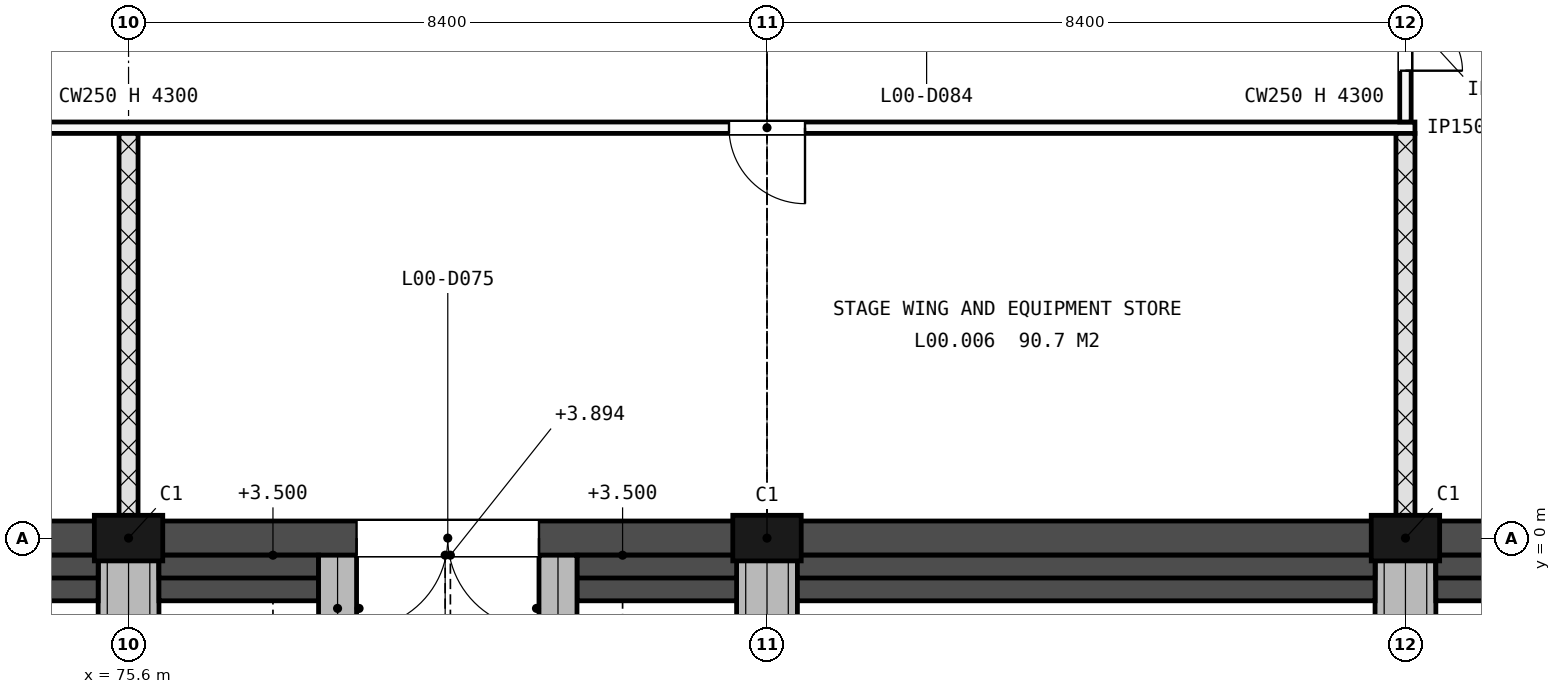
"""IFC4 building model, lengths in metres.
Left out: names, types, materials, properties, quantities, classifications, styles, units other than length and angle.
Written with IfcOpenShell. Run it as: python <this file> out.ifc"""

import sys

from ifc_helpers import new_model, si_unit, direction, frame, frame_2d, origin, origin_2d, place, context, subcontext, project, spatial, rectangle, extrude, element, fill, save


model = new_model("IFC4")
c1 = context("Model", 3, precision=1e-05, world=origin(), true_north=direction((0.0, 1.0)))
c2 = subcontext(c1, "Body", "Model", "MODEL_VIEW")
j1 = project(units=[si_unit("LENGTHUNIT", "METRE"), si_unit("PLANEANGLEUNIT", "RADIAN")], contexts=[c1])
p1 = place(None, origin())
s1 = spatial("IfcSite", under=j1, at=p1, CompositionType="ELEMENT")
p2 = place(p1, origin())
s2 = spatial("IfcBuilding", under=s1, at=p2, CompositionType="ELEMENT")
p3 = place(p2, origin())
s3 = spatial("IfcBuildingStorey", under=s2, at=p3, CompositionType="ELEMENT", Elevation=0.0)
for number, where, z_axis, x_axis in (
    (1, (75.6, 0.0, -0.3), (0.0, 0.0, 1.0), (1.0, 0.0, 0.0)),
    (2, (84.0, 0.0, -0.3), (0.0, 0.0, 1.0), (1.0, 0.0, 0.0)),
    (3, (92.4, 0.0, -0.3), (0.0, 0.0, 1.0), (1.0, 0.0, 0.0)),
):
    element("IfcColumn", number, at=place(p3, frame(where, z_axis=z_axis, x_axis=x_axis)), inside=s3, PredefinedType="PILASTER", context=c2, shape_type="SweptSolid", body=[
        extrude(rectangle(XDim=0.9, YDim=0.6, at=origin_2d()), origin(), (0.0, 0.0, 1.0), 5.4),
    ])
p4 = place(p3, frame((0.0, 0.0, -0.3), z_axis=(0.0, 0.0, 1.0), x_axis=(1.0, 0.0, 0.0)))
e4 = element("IfcWall", 4, at=p4, inside=s3, PredefinedType="SOLIDWALL", context=c2, shape_type="SweptSolid", body=[
    extrude(rectangle(XDim=168.0, YDim=0.45, at=frame_2d((84.0, 0.0))), origin(), (0.0, 0.0, 1.0), 5.4),
])
p5 = place(p4, frame((34.8, 0.0, 2.7)))
e5 = element("IfcOpeningElement", 5, at=p5, cuts=e4, PredefinedType="OPENING", context=c2, shape_type="SweptSolid", body=[
    extrude(rectangle(XDim=1.8, YDim=1.2, at=frame_2d((0.9, 0.6))), frame((0.0, 0.235, 0.0), z_axis=(0.0, -1.0, 0.0), x_axis=(1.0, 0.0, 0.0)), (0.0, 0.0, 1.0), 0.47),
])
p6 = place(p4, frame((69.075, 0.0, 1.5)))
e6 = element("IfcOpeningElement", 6, at=p6, cuts=e4, PredefinedType="OPENING", context=c2, shape_type="SweptSolid", body=[
    extrude(rectangle(XDim=0.45, YDim=2.4, at=frame_2d((0.225, 1.2))), frame((0.0, 0.235, 0.0), z_axis=(0.0, -1.0, 0.0), x_axis=(1.0, 0.0, 0.0)), (0.0, 0.0, 1.0), 0.47),
])
p7 = place(p4, frame((73.275, 0.0, 1.5)))
e7 = element("IfcOpeningElement", 7, at=p7, cuts=e4, PredefinedType="OPENING", context=c2, shape_type="SweptSolid", body=[
    extrude(rectangle(XDim=0.45, YDim=2.4, at=frame_2d((0.225, 1.2))), frame((0.0, 0.235, 0.0), z_axis=(0.0, -1.0, 0.0), x_axis=(1.0, 0.0, 0.0)), (0.0, 0.0, 1.0), 0.47),
])
p8 = place(p4, frame((135.0, 0.0, 2.7)))
e8 = element("IfcOpeningElement", 8, at=p8, cuts=e4, PredefinedType="OPENING", context=c2, shape_type="SweptSolid", body=[
    extrude(rectangle(XDim=1.8, YDim=1.2, at=frame_2d((0.9, 0.6))), frame((0.0, 0.235, 0.0), z_axis=(0.0, -1.0, 0.0), x_axis=(1.0, 0.0, 0.0)), (0.0, 0.0, 1.0), 0.47),
])
p9 = place(p4, frame((144.0, 0.0, 2.7)))
e9 = element("IfcOpeningElement", 9, at=p9, cuts=e4, PredefinedType="OPENING", context=c2, shape_type="SweptSolid", body=[
    extrude(rectangle(XDim=1.8, YDim=1.2, at=frame_2d((0.9, 0.6))), frame((0.0, 0.235, 0.0), z_axis=(0.0, -1.0, 0.0), x_axis=(1.0, 0.0, 0.0)), (0.0, 0.0, 1.0), 0.47),
])
p10 = place(p4, frame((114.6, 0.0, 0.3), z_axis=(0.0, 0.0, 1.0), x_axis=(-1.0, 0.0, 0.0)))
e10 = element("IfcOpeningElement", 10, at=p10, cuts=e4, PredefinedType="OPENING", context=c2, shape_type="SweptSolid", body=[
    extrude(rectangle(XDim=2.1, YDim=2.2, at=frame_2d((1.05, 1.1))), frame((0.0, 0.235, 0.0), z_axis=(0.0, -1.0, 0.0), x_axis=(1.0, 0.0, 0.0)), (0.0, 0.0, 1.0), 0.47),
])
p11 = place(p4, frame((117.3, 0.0, 0.3), z_axis=(0.0, 0.0, 1.0), x_axis=(-1.0, 0.0, 0.0)))
e11 = element("IfcOpeningElement", 11, at=p11, cuts=e4, PredefinedType="OPENING", context=c2, shape_type="SweptSolid", body=[
    extrude(rectangle(XDim=2.1, YDim=2.2, at=frame_2d((1.05, 1.1))), frame((0.0, 0.235, 0.0), z_axis=(0.0, -1.0, 0.0), x_axis=(1.0, 0.0, 0.0)), (0.0, 0.0, 1.0), 0.47),
])
p12 = place(p4, frame((106.05, 0.0, 0.3), z_axis=(0.0, 0.0, 1.0), x_axis=(-1.0, 0.0, 0.0)))
e12 = element("IfcOpeningElement", 12, at=p12, cuts=e4, PredefinedType="OPENING", context=c2, shape_type="SweptSolid", body=[
    extrude(rectangle(XDim=2.1, YDim=2.2, at=frame_2d((1.05, 1.1))), frame((0.0, 0.235, 0.0), z_axis=(0.0, -1.0, 0.0), x_axis=(1.0, 0.0, 0.0)), (0.0, 0.0, 1.0), 0.47),
])
p13 = place(p4, frame((57.25, 0.0, 0.3), z_axis=(0.0, 0.0, 1.0), x_axis=(-1.0, 0.0, 0.0)))
e13 = element("IfcOpeningElement", 13, at=p13, cuts=e4, PredefinedType="OPENING", context=c2, shape_type="SweptSolid", body=[
    extrude(rectangle(XDim=2.1, YDim=2.2, at=frame_2d((1.05, 1.1))), frame((0.0, 0.235, 0.0), z_axis=(0.0, -1.0, 0.0), x_axis=(1.0, 0.0, 0.0)), (0.0, 0.0, 1.0), 0.47),
])
p14 = place(p4, frame((120.75, 0.0, 0.3), z_axis=(0.0, 0.0, 1.0), x_axis=(-1.0, 0.0, 0.0)))
e14 = element("IfcOpeningElement", 14, at=p14, cuts=e4, PredefinedType="OPENING", context=c2, shape_type="SweptSolid", body=[
    extrude(rectangle(XDim=2.1, YDim=2.2, at=frame_2d((1.05, 1.1))), frame((0.0, 0.235, 0.0), z_axis=(0.0, -1.0, 0.0), x_axis=(1.0, 0.0, 0.0)), (0.0, 0.0, 1.0), 0.47),
])
p15 = place(p4, frame((124.95, 0.0, 0.3), z_axis=(0.0, 0.0, 1.0), x_axis=(-1.0, 0.0, 0.0)))
e15 = element("IfcOpeningElement", 15, at=p15, cuts=e4, PredefinedType="OPENING", context=c2, shape_type="SweptSolid", body=[
    extrude(rectangle(XDim=2.1, YDim=2.2, at=frame_2d((1.05, 1.1))), frame((0.0, 0.235, 0.0), z_axis=(0.0, -1.0, 0.0), x_axis=(1.0, 0.0, 0.0)), (0.0, 0.0, 1.0), 0.47),
])
p16 = place(p4, frame((19.45, 0.0, 0.3), z_axis=(0.0, 0.0, 1.0), x_axis=(-1.0, 0.0, 0.0)))
e16 = element("IfcOpeningElement", 16, at=p16, cuts=e4, PredefinedType="OPENING", context=c2, shape_type="SweptSolid", body=[
    extrude(rectangle(XDim=2.1, YDim=2.2, at=frame_2d((1.05, 1.1))), frame((0.0, 0.235, 0.0), z_axis=(0.0, -1.0, 0.0), x_axis=(1.0, 0.0, 0.0)), (0.0, 0.0, 1.0), 0.47),
])
p17 = place(p4, frame((162.25, 0.0, 0.3), z_axis=(0.0, 0.0, 1.0), x_axis=(-1.0, 0.0, 0.0)))
e17 = element("IfcOpeningElement", 17, at=p17, cuts=e4, PredefinedType="OPENING", context=c2, shape_type="SweptSolid", body=[
    extrude(rectangle(XDim=2.1, YDim=2.2, at=frame_2d((1.05, 1.1))), frame((0.0, 0.235, 0.0), z_axis=(0.0, -1.0, 0.0), x_axis=(1.0, 0.0, 0.0)), (0.0, 0.0, 1.0), 0.47),
])
p18 = place(p4, frame((4.8, 0.0, 0.3), z_axis=(0.0, 0.0, 1.0), x_axis=(-1.0, 0.0, 0.0)))
e18 = element("IfcOpeningElement", 18, at=p18, cuts=e4, PredefinedType="OPENING", context=c2, shape_type="SweptSolid", body=[
    extrude(rectangle(XDim=1.2, YDim=2.2, at=frame_2d((0.6, 1.1))), frame((0.0, 0.235, 0.0), z_axis=(0.0, -1.0, 0.0), x_axis=(1.0, 0.0, 0.0)), (0.0, 0.0, 1.0), 0.47),
])
p19 = place(p4, frame((64.8, 0.0, 0.3), z_axis=(0.0, 0.0, 1.0), x_axis=(-1.0, 0.0, 0.0)))
e19 = element("IfcOpeningElement", 19, at=p19, cuts=e4, PredefinedType="OPENING", context=c2, shape_type="SweptSolid", body=[
    extrude(rectangle(XDim=1.2, YDim=2.2, at=frame_2d((0.6, 1.1))), frame((0.0, 0.235, 0.0), z_axis=(0.0, -1.0, 0.0), x_axis=(1.0, 0.0, 0.0)), (0.0, 0.0, 1.0), 0.47),
])
p20 = place(p4, frame((81.0, 0.0, 0.3), z_axis=(0.0, 0.0, 1.0), x_axis=(-1.0, 0.0, 0.0)))
e20 = element("IfcOpeningElement", 20, at=p20, cuts=e4, PredefinedType="OPENING", context=c2, shape_type="SweptSolid", body=[
    extrude(rectangle(XDim=2.4, YDim=2.4, at=frame_2d((1.2, 1.2))), frame((0.0, 0.235, 0.0), z_axis=(0.0, -1.0, 0.0), x_axis=(1.0, 0.0, 0.0)), (0.0, 0.0, 1.0), 0.47),
])
p21 = place(p4, frame((97.8, 0.0, 0.3), z_axis=(0.0, 0.0, 1.0), x_axis=(-1.0, 0.0, 0.0)))
e21 = element("IfcOpeningElement", 21, at=p21, cuts=e4, PredefinedType="OPENING", context=c2, shape_type="SweptSolid", body=[
    extrude(rectangle(XDim=2.4, YDim=2.4, at=frame_2d((1.2, 1.2))), frame((0.0, 0.235, 0.0), z_axis=(0.0, -1.0, 0.0), x_axis=(1.0, 0.0, 0.0)), (0.0, 0.0, 1.0), 0.47),
])
p22 = place(p4, frame((139.8, 0.0, 0.3), z_axis=(0.0, 0.0, 1.0), x_axis=(-1.0, 0.0, 0.0)))
e22 = element("IfcOpeningElement", 22, at=p22, cuts=e4, PredefinedType="OPENING", context=c2, shape_type="SweptSolid", body=[
    extrude(rectangle(XDim=2.4, YDim=2.1, at=frame_2d((1.2, 1.05))), frame((0.0, 0.235, 0.0), z_axis=(0.0, -1.0, 0.0), x_axis=(1.0, 0.0, 0.0)), (0.0, 0.0, 1.0), 0.47),
])
p23 = place(p4, frame((156.3, 0.0, 0.3), z_axis=(0.0, 0.0, 1.0), x_axis=(-1.0, 0.0, 0.0)))
e23 = element("IfcOpeningElement", 23, at=p23, cuts=e4, PredefinedType="OPENING", context=c2, shape_type="SweptSolid", body=[
    extrude(rectangle(XDim=1.8, YDim=2.2, at=frame_2d((0.9, 1.1))), frame((0.0, 0.235, 0.0), z_axis=(0.0, -1.0, 0.0), x_axis=(1.0, 0.0, 0.0)), (0.0, 0.0, 1.0), 0.47),
])
for number, where, z_axis, x_axis in (
    (24, (75.6, -0.225, 0.0), (0.0, 0.0, 1.0), (0.0, -1.0, 0.0)),
    (25, (84.0, -0.225, 0.0), (0.0, 0.0, 1.0), (0.0, -1.0, 0.0)),
    (26, (92.4, -0.225, 0.0), (0.0, 0.0, 1.0), (0.0, -1.0, 0.0)),
):
    element("IfcWall", number, at=place(p3, frame(where, z_axis=z_axis, x_axis=x_axis)), inside=s3, PredefinedType="SOLIDWALL", context=c2, shape_type="SweptSolid", body=[
        extrude(rectangle(XDim=0.9, YDim=0.8, at=frame_2d((0.45, 0.0))), origin(), (0.0, 0.0, 1.0), 5.1),
    ])
p24 = place(p3, frame((67.6, -0.525, 0.0), z_axis=(0.0, 0.0, 1.0), x_axis=(1.0, 0.0, 0.0)))
e27 = element("IfcWall", 27, at=p24, inside=s3, PredefinedType="SOLIDWALL", context=c2, shape_type="SweptSolid", body=[
    extrude(rectangle(XDim=7.6, YDim=0.6, at=frame_2d((3.8, 0.0))), origin(), (0.0, 0.0, 1.0), 0.45),
])
p25 = place(p3, frame((67.6, -0.375, 0.45), z_axis=(0.0, 0.0, 1.0), x_axis=(1.0, 0.0, 0.0)))
e28 = element("IfcWall", 28, at=p25, inside=s3, PredefinedType="SOLIDWALL", context=c2, shape_type="SweptSolid", body=[
    extrude(rectangle(XDim=7.6, YDim=0.3, at=frame_2d((3.8, 0.0))), origin(), (0.0, 0.0, 1.0), 0.45),
])
p26 = place(p3, frame((76.0, -0.525, 0.0), z_axis=(0.0, 0.0, 1.0), x_axis=(1.0, 0.0, 0.0)))
e29 = element("IfcWall", 29, at=p26, inside=s3, PredefinedType="SOLIDWALL", context=c2, shape_type="SweptSolid", body=[
    extrude(rectangle(XDim=2.1, YDim=0.6, at=frame_2d((1.05, 0.0))), origin(), (0.0, 0.0, 1.0), 0.45),
])
p27 = place(p3, frame((76.0, -0.375, 0.45), z_axis=(0.0, 0.0, 1.0), x_axis=(1.0, 0.0, 0.0)))
e30 = element("IfcWall", 30, at=p27, inside=s3, PredefinedType="SOLIDWALL", context=c2, shape_type="SweptSolid", body=[
    extrude(rectangle(XDim=2.1, YDim=0.3, at=frame_2d((1.05, 0.0))), origin(), (0.0, 0.0, 1.0), 0.45),
])
p28 = place(p3, frame((81.5, -0.525, 0.0), z_axis=(0.0, 0.0, 1.0), x_axis=(1.0, 0.0, 0.0)))
e31 = element("IfcWall", 31, at=p28, inside=s3, PredefinedType="SOLIDWALL", context=c2, shape_type="SweptSolid", body=[
    extrude(rectangle(XDim=2.1, YDim=0.6, at=frame_2d((1.05, 0.0))), origin(), (0.0, 0.0, 1.0), 0.45),
])
p29 = place(p3, frame((81.5, -0.375, 0.45), z_axis=(0.0, 0.0, 1.0), x_axis=(1.0, 0.0, 0.0)))
e32 = element("IfcWall", 32, at=p29, inside=s3, PredefinedType="SOLIDWALL", context=c2, shape_type="SweptSolid", body=[
    extrude(rectangle(XDim=2.1, YDim=0.3, at=frame_2d((1.05, 0.0))), origin(), (0.0, 0.0, 1.0), 0.45),
])
p30 = place(p3, frame((84.4, -0.525, 0.0), z_axis=(0.0, 0.0, 1.0), x_axis=(1.0, 0.0, 0.0)))
e33 = element("IfcWall", 33, at=p30, inside=s3, PredefinedType="SOLIDWALL", context=c2, shape_type="SweptSolid", body=[
    extrude(rectangle(XDim=7.6, YDim=0.6, at=frame_2d((3.8, 0.0))), origin(), (0.0, 0.0, 1.0), 0.45),
])
p31 = place(p3, frame((84.4, -0.375, 0.45), z_axis=(0.0, 0.0, 1.0), x_axis=(1.0, 0.0, 0.0)))
e34 = element("IfcWall", 34, at=p31, inside=s3, PredefinedType="SOLIDWALL", context=c2, shape_type="SweptSolid", body=[
    extrude(rectangle(XDim=7.6, YDim=0.3, at=frame_2d((3.8, 0.0))), origin(), (0.0, 0.0, 1.0), 0.45),
])
p32 = place(p3, frame((92.8, -0.525, 0.0), z_axis=(0.0, 0.0, 1.0), x_axis=(1.0, 0.0, 0.0)))
e35 = element("IfcWall", 35, at=p32, inside=s3, PredefinedType="SOLIDWALL", context=c2, shape_type="SweptSolid", body=[
    extrude(rectangle(XDim=2.1, YDim=0.6, at=frame_2d((1.05, 0.0))), origin(), (0.0, 0.0, 1.0), 0.45),
])
p33 = place(p3, frame((92.8, -0.375, 0.45), z_axis=(0.0, 0.0, 1.0), x_axis=(1.0, 0.0, 0.0)))
e36 = element("IfcWall", 36, at=p33, inside=s3, PredefinedType="SOLIDWALL", context=c2, shape_type="SweptSolid", body=[
    extrude(rectangle(XDim=2.1, YDim=0.3, at=frame_2d((1.05, 0.0))), origin(), (0.0, 0.0, 1.0), 0.45),
])
for number, where, z_axis, x_axis in (
    (37, (78.35, -0.225, 0.0), (0.0, 0.0, 1.0), (0.0, -1.0, 0.0)),
    (38, (81.25, -0.225, 0.0), (0.0, 0.0, 1.0), (0.0, -1.0, 0.0)),
):
    element("IfcWall", number, at=place(p3, frame(where, z_axis=z_axis, x_axis=x_axis)), inside=s3, PredefinedType="SOLIDWALL", context=c2, shape_type="SweptSolid", body=[
        extrude(rectangle(XDim=1.4, YDim=0.5, at=frame_2d((0.7, 0.0))), origin(), (0.0, 0.0, 1.0), 3.28),
    ])
p34 = place(p3, frame((63.1, 5.4, 0.0), z_axis=(0.0, 0.0, 1.0), x_axis=(1.0, 0.0, 0.0)))
e39 = element("IfcWall", 39, at=p34, inside=s3, PredefinedType="PARTITIONING", context=c2, shape_type="SweptSolid", body=[
    extrude(rectangle(XDim=29.425, YDim=0.15, at=frame_2d((14.712, 0.0))), origin(), (0.0, 0.0, 1.0), 5.1),
])
p35 = place(p34, frame((5.7, 0.0, 0.0)))
e40 = element("IfcOpeningElement", 40, at=p35, cuts=e39, PredefinedType="OPENING", context=c2, shape_type="SweptSolid", body=[
    extrude(rectangle(XDim=1.0, YDim=2.1, at=frame_2d((0.5, 1.05))), frame((0.0, 0.085, 0.0), z_axis=(0.0, -1.0, 0.0), x_axis=(1.0, 0.0, 0.0)), (0.0, 0.0, 1.0), 0.17),
])
p36 = place(p34, frame((20.4, 0.0, 0.0)))
e41 = element("IfcOpeningElement", 41, at=p36, cuts=e39, PredefinedType="OPENING", context=c2, shape_type="SweptSolid", body=[
    extrude(rectangle(XDim=1.0, YDim=2.1, at=frame_2d((0.5, 1.05))), frame((0.0, 0.085, 0.0), z_axis=(0.0, -1.0, 0.0), x_axis=(1.0, 0.0, 0.0)), (0.0, 0.0, 1.0), 0.17),
])
for number, where, z_axis, x_axis in (
    (42, (75.6, 0.225, 0.0), (0.0, 0.0, 1.0), (0.0, 1.0, 0.0)),
    (43, (92.4, 0.225, 0.0), (0.0, 0.0, 1.0), (0.0, 1.0, 0.0)),
):
    element("IfcWall", number, at=place(p3, frame(where, z_axis=z_axis, x_axis=x_axis)), inside=s3, PredefinedType="SOLIDWALL", context=c2, shape_type="SweptSolid", body=[
        extrude(rectangle(XDim=5.1, YDim=0.25, at=frame_2d((2.55, 0.0))), origin(), (0.0, 0.0, 1.0), 4.3),
    ])
p37 = place(p3, frame((92.4, 5.475, 0.0), z_axis=(0.0, 0.0, 1.0), x_axis=(0.0, 1.0, 0.0)))
e44 = element("IfcWall", 44, at=p37, inside=s3, PredefinedType="PARTITIONING", context=c2, shape_type="SweptSolid", body=[
    extrude(rectangle(XDim=2.85, YDim=0.15, at=frame_2d((1.425, 0.0))), origin(), (0.0, 0.0, 1.0), 4.3),
])
p38 = place(p37, frame((0.675, 0.0, 0.0)))
e45 = element("IfcOpeningElement", 45, at=p38, cuts=e44, PredefinedType="OPENING", context=c2, shape_type="SweptSolid", body=[
    extrude(rectangle(XDim=1.5, YDim=2.1, at=frame_2d((0.75, 1.05))), frame((0.0, 0.085, 0.0), z_axis=(0.0, -1.0, 0.0), x_axis=(1.0, 0.0, 0.0)), (0.0, 0.0, 1.0), 0.17),
])
p39 = place(p20, origin())
e46 = element("IfcDoor", 46, at=p39, inside=s3, OperationType="SINGLE_SWING_LEFT", PredefinedType="DOOR", context=c2, shape_type="SweptSolid", body=[
    extrude(rectangle(XDim=2.4, YDim=0.013, at=frame_2d((1.2, 0.007))), frame((0.0, 0.115, 0.0), z_axis=(0.0, -1.0, 0.0), x_axis=(1.0, 0.0, 0.0)), (0.0, 0.0, 1.0), 0.23),
    extrude(rectangle(XDim=0.075, YDim=2.312, at=frame_2d((0.038, 1.169))), frame((0.0, 0.125, 0.0), z_axis=(0.0, -1.0, 0.0), x_axis=(1.0, 0.0, 0.0)), (0.0, 0.0, 1.0), 0.25),
    extrude(rectangle(XDim=0.075, YDim=2.312, at=frame_2d((2.362, 1.169))), frame((0.0, 0.125, 0.0), z_axis=(0.0, -1.0, 0.0), x_axis=(1.0, 0.0, 0.0)), (0.0, 0.0, 1.0), 0.25),
    extrude(rectangle(XDim=2.4, YDim=0.075, at=frame_2d((1.2, 2.362))), frame((0.0, 0.115, 0.0), z_axis=(0.0, -1.0, 0.0), x_axis=(1.0, 0.0, 0.0)), (0.0, 0.0, 1.0), 0.23),
    extrude(rectangle(XDim=2.25, YDim=2.312, at=frame_2d((1.2, 1.169))), frame((0.0, 0.025, 0.0), z_axis=(0.0, -1.0, 0.0), x_axis=(1.0, 0.0, 0.0)), (0.0, 0.0, 1.0), 0.05),
])
fill(e20, e46)
p40 = place(p36, origin())
e47 = element("IfcDoor", 47, at=p40, inside=s3, OperationType="SINGLE_SWING_RIGHT", PredefinedType="DOOR", context=c2, shape_type="SweptSolid", body=[
    extrude(rectangle(XDim=1.0, YDim=2.1, at=frame_2d((0.5, 1.05))), frame((0.0, 0.025, 0.0), z_axis=(0.0, -1.0, 0.0), x_axis=(1.0, 0.0, 0.0)), (0.0, 0.0, 1.0), 0.05),
])
fill(e41, e47)
p41 = place(p38, origin())
e48 = element("IfcDoor", 48, at=p41, inside=s3, OperationType="DOUBLE_DOOR_SINGLE_SWING", PredefinedType="DOOR", context=c2, shape_type="SweptSolid", body=[
    extrude(rectangle(XDim=1.5, YDim=2.1, at=frame_2d((0.75, 1.05))), frame((0.0, 0.025, 0.0), z_axis=(0.0, -1.0, 0.0), x_axis=(1.0, 0.0, 0.0)), (0.0, 0.0, 1.0), 0.05),
])
fill(e45, e48)
save(model, sys.argv[1])
